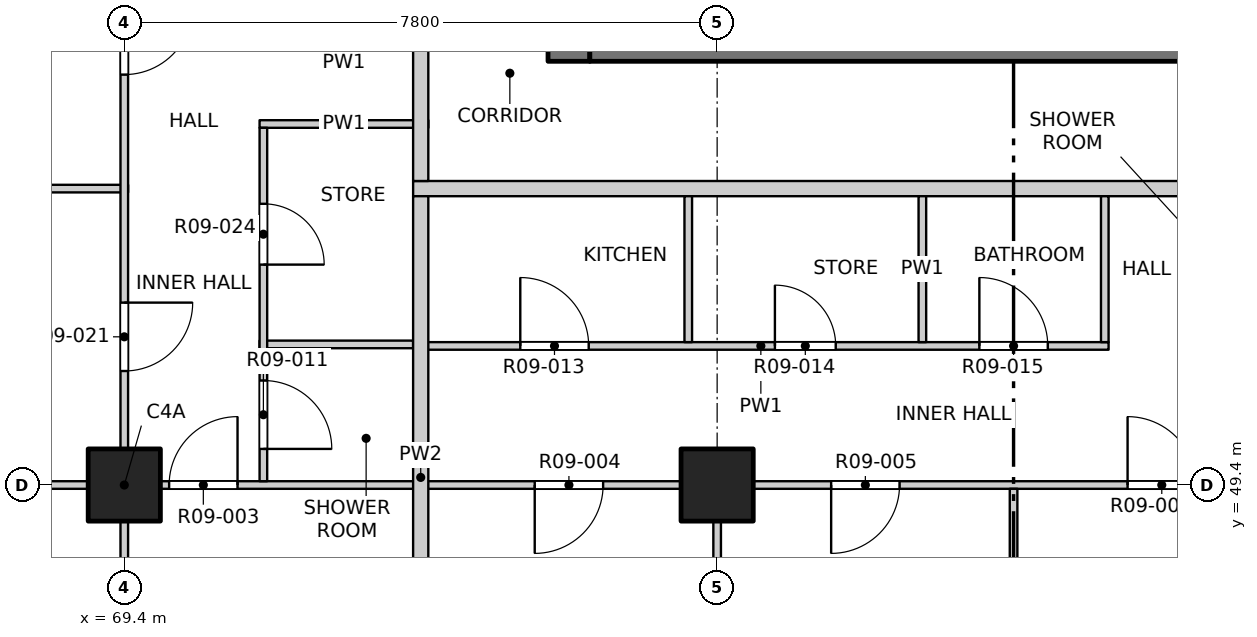
"""IFC4 building model, lengths in metres.
Left out: names, types, materials, properties, quantities, classifications, styles, units other than length and angle.
Written with IfcOpenShell. Run it as: python <this file> out.ifc"""

import sys

from ifc_helpers import new_model, si_unit, direction, frame, frame_2d, origin, origin_2d, place, context, subcontext, project, spatial, rectangle, extrude, element, fill, save


model = new_model("IFC4")
c1 = context("Model", 3, precision=1e-05, world=origin(), true_north=direction((0.0, 1.0)))
c2 = subcontext(c1, "Body", "Model", "MODEL_VIEW")
j1 = project(units=[si_unit("LENGTHUNIT", "METRE"), si_unit("PLANEANGLEUNIT", "RADIAN")], contexts=[c1])
p1 = place(None, origin())
s1 = spatial("IfcSite", under=j1, at=p1, CompositionType="ELEMENT")
p2 = place(p1, origin())
s2 = spatial("IfcBuilding", under=s1, at=p2, CompositionType="ELEMENT")
p3 = place(p2, frame((0.0, 0.0, 110.1)))
s3 = spatial("IfcBuildingStorey", under=s2, at=p3, CompositionType="ELEMENT", Elevation=110.1)
for number, where, z_axis, x_axis in (
    (1, (69.4, 49.4, -0.25), (0.0, 0.0, 1.0), (1.0, 0.0, 0.0)),
    (2, (77.2, 49.4, -0.25), (0.0, 0.0, 1.0), (1.0, 0.0, 0.0)),
):
    element("IfcColumn", number, at=place(p3, frame(where, z_axis=z_axis, x_axis=x_axis)), inside=s3, PredefinedType="COLUMN", context=c2, shape_type="SweptSolid", body=[
        extrude(rectangle(XDim=0.95, YDim=0.95, at=origin_2d()), origin(), (0.0, 0.0, 1.0), 3.4),
    ])
p4 = place(p3, frame((75.25, 54.975, -0.25), z_axis=(0.0, 0.0, 1.0), x_axis=(0.0, 1.0, 0.0)))
e3 = element("IfcWall", 3, at=p4, inside=s3, PredefinedType="SOLIDWALL", context=c2, shape_type="SweptSolid", body=[
    extrude(rectangle(XDim=22.325, YDim=0.55, at=frame_2d((11.163, 0.0))), origin(), (0.0, 0.0, 1.0), 3.4),
])
p5 = place(p4, frame((7.475, 0.0, 0.25)))
e4 = element("IfcOpeningElement", 4, at=p5, cuts=e3, PredefinedType="OPENING", context=c2, shape_type="SweptSolid", body=[
    extrude(rectangle(XDim=0.9, YDim=2.1, at=frame_2d((0.45, 1.05))), frame((0.0, 0.285, 0.0), z_axis=(0.0, -1.0, 0.0), x_axis=(1.0, 0.0, 0.0)), (0.0, 0.0, 1.0), 0.57),
])
p6 = place(p4, frame((10.775, 0.0, 0.25)))
e5 = element("IfcOpeningElement", 5, at=p6, cuts=e3, PredefinedType="OPENING", context=c2, shape_type="SweptSolid", body=[
    extrude(rectangle(XDim=0.9, YDim=2.1, at=frame_2d((0.45, 1.05))), frame((0.0, 0.285, 0.0), z_axis=(0.0, -1.0, 0.0), x_axis=(1.0, 0.0, 0.0)), (0.0, 0.0, 1.0), 0.57),
])
p7 = place(p4, frame((15.275, 0.0, 0.25)))
e6 = element("IfcOpeningElement", 6, at=p7, cuts=e3, PredefinedType="OPENING", context=c2, shape_type="SweptSolid", body=[
    extrude(rectangle(XDim=0.9, YDim=2.1, at=frame_2d((0.45, 1.05))), frame((0.0, 0.285, 0.0), z_axis=(0.0, -1.0, 0.0), x_axis=(1.0, 0.0, 0.0)), (0.0, 0.0, 1.0), 0.57),
])
p8 = place(p4, frame((20.075, 0.0, 0.25)))
e7 = element("IfcOpeningElement", 7, at=p8, cuts=e3, PredefinedType="OPENING", context=c2, shape_type="SweptSolid", body=[
    extrude(rectangle(XDim=0.9, YDim=2.1, at=frame_2d((0.45, 1.05))), frame((0.0, 0.285, 0.0), z_axis=(0.0, -1.0, 0.0), x_axis=(1.0, 0.0, 0.0)), (0.0, 0.0, 1.0), 0.57),
])
p9 = place(p3, frame((75.525, 55.25, -0.25), z_axis=(0.0, 0.0, 1.0), x_axis=(1.0, 0.0, 0.0)))
e8 = element("IfcWall", 8, at=p9, inside=s3, PredefinedType="SOLIDWALL", context=c2, shape_type="SweptSolid", body=[
    extrude(rectangle(XDim=18.95, YDim=0.55, at=frame_2d((9.475, 0.0))), origin(), (0.0, 0.0, 1.0), 3.4),
])
p10 = place(p9, frame((8.725, 0.0, 0.25)))
e9 = element("IfcOpeningElement", 9, at=p10, cuts=e8, PredefinedType="OPENING", context=c2, shape_type="SweptSolid", body=[
    extrude(rectangle(XDim=1.5, YDim=2.1, at=frame_2d((0.75, 1.05))), frame((0.0, 0.285, 0.0), z_axis=(0.0, -1.0, 0.0), x_axis=(1.0, 0.0, 0.0)), (0.0, 0.0, 1.0), 0.57),
])
p11 = place(p3, frame((65.8, 49.4, 0.0), z_axis=(0.0, 0.0, 1.0), x_axis=(1.0, 0.0, 0.0)))
e10 = element("IfcWall", 10, at=p11, inside=s3, PredefinedType="PARTITIONING", context=c2, shape_type="SweptSolid", body=[
    extrude(rectangle(XDim=38.4, YDim=0.1, at=frame_2d((19.2, 0.0))), origin(), (0.0, 0.0, 1.0), 3.15),
])
p12 = place(p11, frame((4.19, 0.0, 0.0)))
e11 = element("IfcOpeningElement", 11, at=p12, cuts=e10, PredefinedType="OPENING", context=c2, shape_type="SweptSolid", body=[
    extrude(rectangle(XDim=0.9, YDim=2.1, at=frame_2d((0.45, 1.05))), frame((0.0, 0.06, 0.0), z_axis=(0.0, -1.0, 0.0), x_axis=(1.0, 0.0, 0.0)), (0.0, 0.0, 1.0), 0.12),
])
p13 = place(p11, frame((9.0, 0.0, 0.0)))
e12 = element("IfcOpeningElement", 12, at=p13, cuts=e10, PredefinedType="OPENING", context=c2, shape_type="SweptSolid", body=[
    extrude(rectangle(XDim=0.9, YDim=2.1, at=frame_2d((0.45, 1.05))), frame((0.0, 0.06, 0.0), z_axis=(0.0, -1.0, 0.0), x_axis=(1.0, 0.0, 0.0)), (0.0, 0.0, 1.0), 0.12),
])
p14 = place(p11, frame((12.9, 0.0, 0.0)))
e13 = element("IfcOpeningElement", 13, at=p14, cuts=e10, PredefinedType="OPENING", context=c2, shape_type="SweptSolid", body=[
    extrude(rectangle(XDim=0.9, YDim=2.1, at=frame_2d((0.45, 1.05))), frame((0.0, 0.06, 0.0), z_axis=(0.0, -1.0, 0.0), x_axis=(1.0, 0.0, 0.0)), (0.0, 0.0, 1.0), 0.12),
])
p15 = place(p11, frame((16.8, 0.0, 0.0)))
e14 = element("IfcOpeningElement", 14, at=p15, cuts=e10, PredefinedType="OPENING", context=c2, shape_type="SweptSolid", body=[
    extrude(rectangle(XDim=0.9, YDim=2.1, at=frame_2d((0.45, 1.05))), frame((0.0, 0.06, 0.0), z_axis=(0.0, -1.0, 0.0), x_axis=(1.0, 0.0, 0.0)), (0.0, 0.0, 1.0), 0.12),
])
p16 = place(p11, frame((20.7, 0.0, 0.0)))
e15 = element("IfcOpeningElement", 15, at=p16, cuts=e10, PredefinedType="OPENING", context=c2, shape_type="SweptSolid", body=[
    extrude(rectangle(XDim=0.9, YDim=2.1, at=frame_2d((0.45, 1.05))), frame((0.0, 0.06, 0.0), z_axis=(0.0, -1.0, 0.0), x_axis=(1.0, 0.0, 0.0)), (0.0, 0.0, 1.0), 0.12),
])
p17 = place(p11, frame((24.6, 0.0, 0.0)))
e16 = element("IfcOpeningElement", 16, at=p17, cuts=e10, PredefinedType="OPENING", context=c2, shape_type="SweptSolid", body=[
    extrude(rectangle(XDim=0.9, YDim=2.1, at=frame_2d((0.45, 1.05))), frame((0.0, 0.06, 0.0), z_axis=(0.0, -1.0, 0.0), x_axis=(1.0, 0.0, 0.0)), (0.0, 0.0, 1.0), 0.12),
])
p18 = place(p11, frame((28.5, 0.0, 0.0)))
e17 = element("IfcOpeningElement", 17, at=p18, cuts=e10, PredefinedType="OPENING", context=c2, shape_type="SweptSolid", body=[
    extrude(rectangle(XDim=0.9, YDim=2.1, at=frame_2d((0.45, 1.05))), frame((0.0, 0.06, 0.0), z_axis=(0.0, -1.0, 0.0), x_axis=(1.0, 0.0, 0.0)), (0.0, 0.0, 1.0), 0.12),
])
p19 = place(p11, frame((33.31, 0.0, 0.0)))
e18 = element("IfcOpeningElement", 18, at=p19, cuts=e10, PredefinedType="OPENING", context=c2, shape_type="SweptSolid", body=[
    extrude(rectangle(XDim=0.9, YDim=2.1, at=frame_2d((0.45, 1.05))), frame((0.0, 0.06, 0.0), z_axis=(0.0, -1.0, 0.0), x_axis=(1.0, 0.0, 0.0)), (0.0, 0.0, 1.0), 0.12),
])
p20 = place(p3, frame((73.2, 51.23, 0.0), z_axis=(0.0, 0.0, 1.0), x_axis=(1.0, 0.0, 0.0)))
e19 = element("IfcWall", 19, at=p20, inside=s3, PredefinedType="PARTITIONING", context=c2, shape_type="SweptSolid", body=[
    extrude(rectangle(XDim=9.15, YDim=0.1, at=frame_2d((4.575, 0.0))), origin(), (0.0, 0.0, 1.0), 3.15),
])
p21 = place(p20, frame((1.41, 0.0, 0.0)))
e20 = element("IfcOpeningElement", 20, at=p21, cuts=e19, PredefinedType="OPENING", context=c2, shape_type="SweptSolid", body=[
    extrude(rectangle(XDim=0.9, YDim=2.1, at=frame_2d((0.45, 1.05))), frame((0.0, 0.06, 0.0), z_axis=(0.0, -1.0, 0.0), x_axis=(1.0, 0.0, 0.0)), (0.0, 0.0, 1.0), 0.12),
])
p22 = place(p20, frame((4.76, 0.0, 0.0)))
e21 = element("IfcOpeningElement", 21, at=p22, cuts=e19, PredefinedType="OPENING", context=c2, shape_type="SweptSolid", body=[
    extrude(rectangle(XDim=0.8, YDim=2.1, at=frame_2d((0.4, 1.05))), frame((0.0, 0.06, 0.0), z_axis=(0.0, -1.0, 0.0), x_axis=(1.0, 0.0, 0.0)), (0.0, 0.0, 1.0), 0.12),
])
p23 = place(p20, frame((7.45, 0.0, 0.0)))
e22 = element("IfcOpeningElement", 22, at=p23, cuts=e19, PredefinedType="OPENING", context=c2, shape_type="SweptSolid", body=[
    extrude(rectangle(XDim=0.9, YDim=2.1, at=frame_2d((0.45, 1.05))), frame((0.0, 0.06, 0.0), z_axis=(0.0, -1.0, 0.0), x_axis=(1.0, 0.0, 0.0)), (0.0, 0.0, 1.0), 0.12),
])
p24 = place(p3, frame((71.18, 51.25, 0.0), z_axis=(0.0, 0.0, 1.0), x_axis=(1.0, 0.0, 0.0)))
e23 = element("IfcWall", 23, at=p24, inside=s3, PredefinedType="PARTITIONING", context=c2, shape_type="SweptSolid", body=[
    extrude(rectangle(XDim=2.02, YDim=0.1, at=frame_2d((1.01, 0.0))), origin(), (0.0, 0.0, 1.0), 3.15),
])
p25 = place(p3, frame((65.8, 53.3, 0.0), z_axis=(0.0, 0.0, 1.0), x_axis=(1.0, 0.0, 0.0)))
e24 = element("IfcWall", 24, at=p25, inside=s3, PredefinedType="PARTITIONING", context=c2, shape_type="SweptSolid", body=[
    extrude(rectangle(XDim=3.65, YDim=0.1, at=frame_2d((1.825, 0.0))), origin(), (0.0, 0.0, 1.0), 3.15),
])
p26 = place(p3, frame((73.2, 53.3, 0.0), z_axis=(0.0, 0.0, 1.0), x_axis=(1.0, 0.0, 0.0)))
e25 = element("IfcWall", 25, at=p26, inside=s3, PredefinedType="PARTITIONING", context=c2, shape_type="SweptSolid", body=[
    extrude(rectangle(XDim=23.6, YDim=0.2, at=frame_2d((11.8, 0.0))), origin(), (0.0, 0.0, 1.0), 3.15),
])
p27 = place(p26, frame((10.375, 0.0, 0.0)))
e26 = element("IfcOpeningElement", 26, at=p27, cuts=e25, PredefinedType="OPENING", context=c2, shape_type="SweptSolid", body=[
    extrude(rectangle(XDim=1.0, YDim=2.1, at=frame_2d((0.5, 1.05))), frame((0.0, 0.11, 0.0), z_axis=(0.0, -1.0, 0.0), x_axis=(1.0, 0.0, 0.0)), (0.0, 0.0, 1.0), 0.22),
])
p28 = place(p26, frame((22.075, 0.0, 0.0)))
e27 = element("IfcOpeningElement", 27, at=p28, cuts=e25, PredefinedType="OPENING", context=c2, shape_type="SweptSolid", body=[
    extrude(rectangle(XDim=1.0, YDim=2.1, at=frame_2d((0.5, 1.05))), frame((0.0, 0.11, 0.0), z_axis=(0.0, -1.0, 0.0), x_axis=(1.0, 0.0, 0.0)), (0.0, 0.0, 1.0), 0.22),
])
p29 = place(p3, frame((71.18, 54.15, 0.0), z_axis=(0.0, 0.0, 1.0), x_axis=(1.0, 0.0, 0.0)))
e28 = element("IfcWall", 28, at=p29, inside=s3, PredefinedType="PARTITIONING", context=c2, shape_type="SweptSolid", body=[
    extrude(rectangle(XDim=2.22, YDim=0.1, at=frame_2d((1.11, 0.0))), origin(), (0.0, 0.0, 1.0), 3.15),
])
p30 = place(p3, frame((69.4, 45.8, 0.0), z_axis=(0.0, 0.0, 1.0), x_axis=(0.0, 1.0, 0.0)))
e29 = element("IfcWall", 29, at=p30, inside=s3, PredefinedType="PARTITIONING", context=c2, shape_type="SweptSolid", body=[
    extrude(rectangle(XDim=38.4, YDim=0.1, at=frame_2d((19.2, 0.0))), origin(), (0.0, 0.0, 1.0), 3.15),
])
p31 = place(p30, frame((1.05, 0.0, 0.0)))
e30 = element("IfcOpeningElement", 30, at=p31, cuts=e29, PredefinedType="OPENING", context=c2, shape_type="SweptSolid", body=[
    extrude(rectangle(XDim=1.2, YDim=2.1, at=frame_2d((0.6, 1.05))), frame((0.0, 0.06, 0.0), z_axis=(0.0, -1.0, 0.0), x_axis=(1.0, 0.0, 0.0)), (0.0, 0.0, 1.0), 0.12),
])
p32 = place(p30, frame((5.1, 0.0, 0.0)))
e31 = element("IfcOpeningElement", 31, at=p32, cuts=e29, PredefinedType="OPENING", context=c2, shape_type="SweptSolid", body=[
    extrude(rectangle(XDim=0.9, YDim=2.1, at=frame_2d((0.45, 1.05))), frame((0.0, 0.06, 0.0), z_axis=(0.0, -1.0, 0.0), x_axis=(1.0, 0.0, 0.0)), (0.0, 0.0, 1.0), 0.12),
])
p33 = place(p30, frame((9.0, 0.0, 0.0)))
e32 = element("IfcOpeningElement", 32, at=p33, cuts=e29, PredefinedType="OPENING", context=c2, shape_type="SweptSolid", body=[
    extrude(rectangle(XDim=0.9, YDim=2.1, at=frame_2d((0.45, 1.05))), frame((0.0, 0.06, 0.0), z_axis=(0.0, -1.0, 0.0), x_axis=(1.0, 0.0, 0.0)), (0.0, 0.0, 1.0), 0.12),
])
p34 = place(p30, frame((12.9, 0.0, 0.0)))
e33 = element("IfcOpeningElement", 33, at=p34, cuts=e29, PredefinedType="OPENING", context=c2, shape_type="SweptSolid", body=[
    extrude(rectangle(XDim=0.9, YDim=2.1, at=frame_2d((0.45, 1.05))), frame((0.0, 0.06, 0.0), z_axis=(0.0, -1.0, 0.0), x_axis=(1.0, 0.0, 0.0)), (0.0, 0.0, 1.0), 0.12),
])
p35 = place(p30, frame((16.8, 0.0, 0.0)))
e34 = element("IfcOpeningElement", 34, at=p35, cuts=e29, PredefinedType="OPENING", context=c2, shape_type="SweptSolid", body=[
    extrude(rectangle(XDim=0.9, YDim=2.1, at=frame_2d((0.45, 1.05))), frame((0.0, 0.06, 0.0), z_axis=(0.0, -1.0, 0.0), x_axis=(1.0, 0.0, 0.0)), (0.0, 0.0, 1.0), 0.12),
])
p36 = place(p30, frame((20.7, 0.0, 0.0)))
e35 = element("IfcOpeningElement", 35, at=p36, cuts=e29, PredefinedType="OPENING", context=c2, shape_type="SweptSolid", body=[
    extrude(rectangle(XDim=0.9, YDim=2.1, at=frame_2d((0.45, 1.05))), frame((0.0, 0.06, 0.0), z_axis=(0.0, -1.0, 0.0), x_axis=(1.0, 0.0, 0.0)), (0.0, 0.0, 1.0), 0.12),
])
p37 = place(p30, frame((24.6, 0.0, 0.0)))
e36 = element("IfcOpeningElement", 36, at=p37, cuts=e29, PredefinedType="OPENING", context=c2, shape_type="SweptSolid", body=[
    extrude(rectangle(XDim=0.9, YDim=2.1, at=frame_2d((0.45, 1.05))), frame((0.0, 0.06, 0.0), z_axis=(0.0, -1.0, 0.0), x_axis=(1.0, 0.0, 0.0)), (0.0, 0.0, 1.0), 0.12),
])
p38 = place(p30, frame((28.5, 0.0, 0.0)))
e37 = element("IfcOpeningElement", 37, at=p38, cuts=e29, PredefinedType="OPENING", context=c2, shape_type="SweptSolid", body=[
    extrude(rectangle(XDim=0.9, YDim=2.1, at=frame_2d((0.45, 1.05))), frame((0.0, 0.06, 0.0), z_axis=(0.0, -1.0, 0.0), x_axis=(1.0, 0.0, 0.0)), (0.0, 0.0, 1.0), 0.12),
])
p39 = place(p30, frame((32.4, 0.0, 0.0)))
e38 = element("IfcOpeningElement", 38, at=p39, cuts=e29, PredefinedType="OPENING", context=c2, shape_type="SweptSolid", body=[
    extrude(rectangle(XDim=0.9, YDim=2.1, at=frame_2d((0.45, 1.05))), frame((0.0, 0.06, 0.0), z_axis=(0.0, -1.0, 0.0), x_axis=(1.0, 0.0, 0.0)), (0.0, 0.0, 1.0), 0.12),
])
p40 = place(p30, frame((36.15, 0.0, 0.0)))
e39 = element("IfcOpeningElement", 39, at=p40, cuts=e29, PredefinedType="OPENING", context=c2, shape_type="SweptSolid", body=[
    extrude(rectangle(XDim=1.2, YDim=2.1, at=frame_2d((0.6, 1.05))), frame((0.0, 0.06, 0.0), z_axis=(0.0, -1.0, 0.0), x_axis=(1.0, 0.0, 0.0)), (0.0, 0.0, 1.0), 0.12),
])
p41 = place(p3, frame((71.23, 49.45, 0.0), z_axis=(0.0, 0.0, 1.0), x_axis=(0.0, 1.0, 0.0)))
e40 = element("IfcWall", 40, at=p41, inside=s3, PredefinedType="PARTITIONING", context=c2, shape_type="SweptSolid", body=[
    extrude(rectangle(XDim=4.65, YDim=0.1, at=frame_2d((2.325, 0.0))), origin(), (0.0, 0.0, 1.0), 3.15),
])
p42 = place(p41, frame((0.425, 0.0, 0.0)))
e41 = element("IfcOpeningElement", 41, at=p42, cuts=e40, PredefinedType="OPENING", context=c2, shape_type="SweptSolid", body=[
    extrude(rectangle(XDim=0.9, YDim=2.1, at=frame_2d((0.45, 1.05))), frame((0.0, 0.06, 0.0), z_axis=(0.0, -1.0, 0.0), x_axis=(1.0, 0.0, 0.0)), (0.0, 0.0, 1.0), 0.12),
])
p43 = place(p41, frame((2.85, 0.0, 0.0)))
e42 = element("IfcOpeningElement", 42, at=p43, cuts=e40, PredefinedType="OPENING", context=c2, shape_type="SweptSolid", body=[
    extrude(rectangle(XDim=0.8, YDim=2.1, at=frame_2d((0.4, 1.05))), frame((0.0, 0.06, 0.0), z_axis=(0.0, -1.0, 0.0), x_axis=(1.0, 0.0, 0.0)), (0.0, 0.0, 1.0), 0.12),
])
p44 = place(p3, frame((73.3, 45.8, 0.0), z_axis=(0.0, 0.0, 1.0), x_axis=(0.0, 1.0, 0.0)))
e43 = element("IfcWall", 43, at=p44, inside=s3, PredefinedType="PARTITIONING", context=c2, shape_type="SweptSolid", body=[
    extrude(rectangle(XDim=7.4, YDim=0.2, at=frame_2d((3.7, 0.0))), origin(), (0.0, 0.0, 1.0), 3.15),
])
p45 = place(p3, frame((73.3, 53.4, 0.0), z_axis=(0.0, 0.0, 1.0), x_axis=(0.0, 1.0, 0.0)))
e44 = element("IfcWall", 44, at=p45, inside=s3, PredefinedType="PARTITIONING", context=c2, shape_type="SweptSolid", body=[
    extrude(rectangle(XDim=30.8, YDim=0.2, at=frame_2d((15.4, 0.0))), origin(), (0.0, 0.0, 1.0), 3.15),
])
p46 = place(p45, frame((2.025, 0.0, 0.0)))
e45 = element("IfcOpeningElement", 45, at=p46, cuts=e44, PredefinedType="OPENING", context=c2, shape_type="SweptSolid", body=[
    extrude(rectangle(XDim=1.0, YDim=2.1, at=frame_2d((0.5, 1.05))), frame((0.0, 0.11, 0.0), z_axis=(0.0, -1.0, 0.0), x_axis=(1.0, 0.0, 0.0)), (0.0, 0.0, 1.0), 0.22),
])
p47 = place(p45, frame((14.875, 0.0, 0.0)))
e46 = element("IfcOpeningElement", 46, at=p47, cuts=e44, PredefinedType="OPENING", context=c2, shape_type="SweptSolid", body=[
    extrude(rectangle(XDim=1.0, YDim=2.1, at=frame_2d((0.5, 1.05))), frame((0.0, 0.11, 0.0), z_axis=(0.0, -1.0, 0.0), x_axis=(1.0, 0.0, 0.0)), (0.0, 0.0, 1.0), 0.22),
])
p48 = place(p45, frame((25.225, 0.0, 0.0)))
e47 = element("IfcOpeningElement", 47, at=p48, cuts=e44, PredefinedType="OPENING", context=c2, shape_type="SweptSolid", body=[
    extrude(rectangle(XDim=1.0, YDim=2.1, at=frame_2d((0.5, 1.05))), frame((0.0, 0.11, 0.0), z_axis=(0.0, -1.0, 0.0), x_axis=(1.0, 0.0, 0.0)), (0.0, 0.0, 1.0), 0.22),
])
p49 = place(p3, frame((76.82, 51.28, 0.0), z_axis=(0.0, 0.0, 1.0), x_axis=(0.0, 1.0, 0.0)))
e48 = element("IfcWall", 48, at=p49, inside=s3, PredefinedType="PARTITIONING", context=c2, shape_type="SweptSolid", body=[
    extrude(rectangle(XDim=1.92, YDim=0.1, at=frame_2d((0.96, 0.0))), origin(), (0.0, 0.0, 1.0), 3.15),
])
p50 = place(p3, frame((77.2, 45.8, 0.0), z_axis=(0.0, 0.0, 1.0), x_axis=(0.0, 1.0, 0.0)))
e49 = element("IfcWall", 49, at=p50, inside=s3, PredefinedType="PARTITIONING", context=c2, shape_type="SweptSolid", body=[
    extrude(rectangle(XDim=3.55, YDim=0.1, at=frame_2d((1.775, 0.0))), origin(), (0.0, 0.0, 1.0), 3.15),
])
p51 = place(p3, frame((79.9, 51.28, 0.0), z_axis=(0.0, 0.0, 1.0), x_axis=(0.0, 1.0, 0.0)))
e50 = element("IfcWall", 50, at=p51, inside=s3, PredefinedType="PARTITIONING", context=c2, shape_type="SweptSolid", body=[
    extrude(rectangle(XDim=1.92, YDim=0.1, at=frame_2d((0.96, 0.0))), origin(), (0.0, 0.0, 1.0), 3.15),
])
p52 = place(p3, frame((81.1, 45.8, 0.0), z_axis=(0.0, 0.0, 1.0), x_axis=(0.0, 1.0, 0.0)))
e51 = element("IfcWall", 51, at=p52, inside=s3, PredefinedType="PARTITIONING", context=c2, shape_type="SweptSolid", body=[
    extrude(rectangle(XDim=3.55, YDim=0.1, at=frame_2d((1.775, 0.0))), origin(), (0.0, 0.0, 1.0), 2.55),
])
p53 = place(p3, frame((82.3, 51.28, 0.0), z_axis=(0.0, 0.0, 1.0), x_axis=(0.0, 1.0, 0.0)))
e52 = element("IfcWall", 52, at=p53, inside=s3, PredefinedType="PARTITIONING", context=c2, shape_type="SweptSolid", body=[
    extrude(rectangle(XDim=1.92, YDim=0.1, at=frame_2d((0.96, 0.0))), origin(), (0.0, 0.0, 1.0), 3.15),
])
p54 = place(p12, origin())
e53 = element("IfcDoor", 53, at=p54, inside=s3, OperationType="SINGLE_SWING_RIGHT", PredefinedType="DOOR", context=c2, shape_type="SweptSolid", body=[
    extrude(rectangle(XDim=0.9, YDim=2.1, at=frame_2d((0.45, 1.05))), frame((0.0, 0.025, 0.0), z_axis=(0.0, -1.0, 0.0), x_axis=(1.0, 0.0, 0.0)), (0.0, 0.0, 1.0), 0.05),
])
fill(e11, e53)
p55 = place(p13, origin())
e54 = element("IfcDoor", 54, at=p55, inside=s3, OperationType="SINGLE_SWING_RIGHT", PredefinedType="DOOR", context=c2, shape_type="SweptSolid", body=[
    extrude(rectangle(XDim=0.9, YDim=2.1, at=frame_2d((0.45, 1.05))), frame((0.0, 0.025, 0.0), z_axis=(0.0, -1.0, 0.0), x_axis=(1.0, 0.0, 0.0)), (0.0, 0.0, 1.0), 0.05),
])
fill(e12, e54)
p56 = place(p14, origin())
e55 = element("IfcDoor", 55, at=p56, inside=s3, OperationType="SINGLE_SWING_RIGHT", PredefinedType="DOOR", context=c2, shape_type="SweptSolid", body=[
    extrude(rectangle(XDim=0.9, YDim=2.1, at=frame_2d((0.45, 1.05))), frame((0.0, 0.025, 0.0), z_axis=(0.0, -1.0, 0.0), x_axis=(1.0, 0.0, 0.0)), (0.0, 0.0, 1.0), 0.05),
])
fill(e13, e55)
p57 = place(p15, origin())
e56 = element("IfcDoor", 56, at=p57, inside=s3, OperationType="SINGLE_SWING_LEFT", PredefinedType="DOOR", context=c2, shape_type="SweptSolid", body=[
    extrude(rectangle(XDim=0.9, YDim=2.1, at=frame_2d((0.45, 1.05))), frame((0.0, 0.025, 0.0), z_axis=(0.0, -1.0, 0.0), x_axis=(1.0, 0.0, 0.0)), (0.0, 0.0, 1.0), 0.05),
])
fill(e14, e56)
p58 = place(p42, origin())
e57 = element("IfcDoor", 57, at=p58, inside=s3, OperationType="SINGLE_SWING_RIGHT", PredefinedType="DOOR", context=c2, shape_type="SweptSolid", body=[
    extrude(rectangle(XDim=0.9, YDim=2.1, at=frame_2d((0.45, 1.05))), frame((0.0, 0.025, 0.0), z_axis=(0.0, -1.0, 0.0), x_axis=(1.0, 0.0, 0.0)), (0.0, 0.0, 1.0), 0.05),
])
fill(e41, e57)
p59 = place(p21, origin())
e58 = element("IfcDoor", 58, at=p59, inside=s3, OperationType="SINGLE_SWING_LEFT", PredefinedType="DOOR", context=c2, shape_type="SweptSolid", body=[
    extrude(rectangle(XDim=0.9, YDim=2.1, at=frame_2d((0.45, 1.05))), frame((0.0, 0.025, 0.0), z_axis=(0.0, -1.0, 0.0), x_axis=(1.0, 0.0, 0.0)), (0.0, 0.0, 1.0), 0.05),
])
fill(e20, e58)
p60 = place(p22, origin())
e59 = element("IfcDoor", 59, at=p60, inside=s3, OperationType="SINGLE_SWING_LEFT", PredefinedType="DOOR", context=c2, shape_type="SweptSolid", body=[
    extrude(rectangle(XDim=0.8, YDim=2.1, at=frame_2d((0.4, 1.05))), frame((0.0, 0.025, 0.0), z_axis=(0.0, -1.0, 0.0), x_axis=(1.0, 0.0, 0.0)), (0.0, 0.0, 1.0), 0.05),
])
fill(e21, e59)
p61 = place(p23, origin())
e60 = element("IfcDoor", 60, at=p61, inside=s3, OperationType="SINGLE_SWING_LEFT", PredefinedType="DOOR", context=c2, shape_type="SweptSolid", body=[
    extrude(rectangle(XDim=0.9, YDim=2.1, at=frame_2d((0.45, 1.05))), frame((0.0, 0.025, 0.0), z_axis=(0.0, -1.0, 0.0), x_axis=(1.0, 0.0, 0.0)), (0.0, 0.0, 1.0), 0.05),
])
fill(e22, e60)
p62 = place(p32, origin())
e61 = element("IfcDoor", 61, at=p62, inside=s3, OperationType="SINGLE_SWING_LEFT", PredefinedType="DOOR", context=c2, shape_type="SweptSolid", body=[
    extrude(rectangle(XDim=0.9, YDim=2.1, at=frame_2d((0.45, 1.05))), frame((0.0, 0.025, 0.0), z_axis=(0.0, -1.0, 0.0), x_axis=(1.0, 0.0, 0.0)), (0.0, 0.0, 1.0), 0.05),
])
fill(e31, e61)
p63 = place(p43, origin())
e62 = element("IfcDoor", 62, at=p63, inside=s3, OperationType="SINGLE_SWING_RIGHT", PredefinedType="DOOR", context=c2, shape_type="SweptSolid", body=[
    extrude(rectangle(XDim=0.8, YDim=2.1, at=frame_2d((0.4, 1.05))), frame((0.0, 0.025, 0.0), z_axis=(0.0, -1.0, 0.0), x_axis=(1.0, 0.0, 0.0)), (0.0, 0.0, 1.0), 0.05),
])
fill(e42, e62)
p64 = place(p33, origin())
e63 = element("IfcDoor", 63, at=p64, inside=s3, OperationType="SINGLE_SWING_LEFT", PredefinedType="DOOR", context=c2, shape_type="SweptSolid", body=[
    extrude(rectangle(XDim=0.9, YDim=2.1, at=frame_2d((0.45, 1.05))), frame((0.0, 0.025, 0.0), z_axis=(0.0, -1.0, 0.0), x_axis=(1.0, 0.0, 0.0)), (0.0, 0.0, 1.0), 0.05),
])
fill(e32, e63)
save(model, sys.argv[1])
